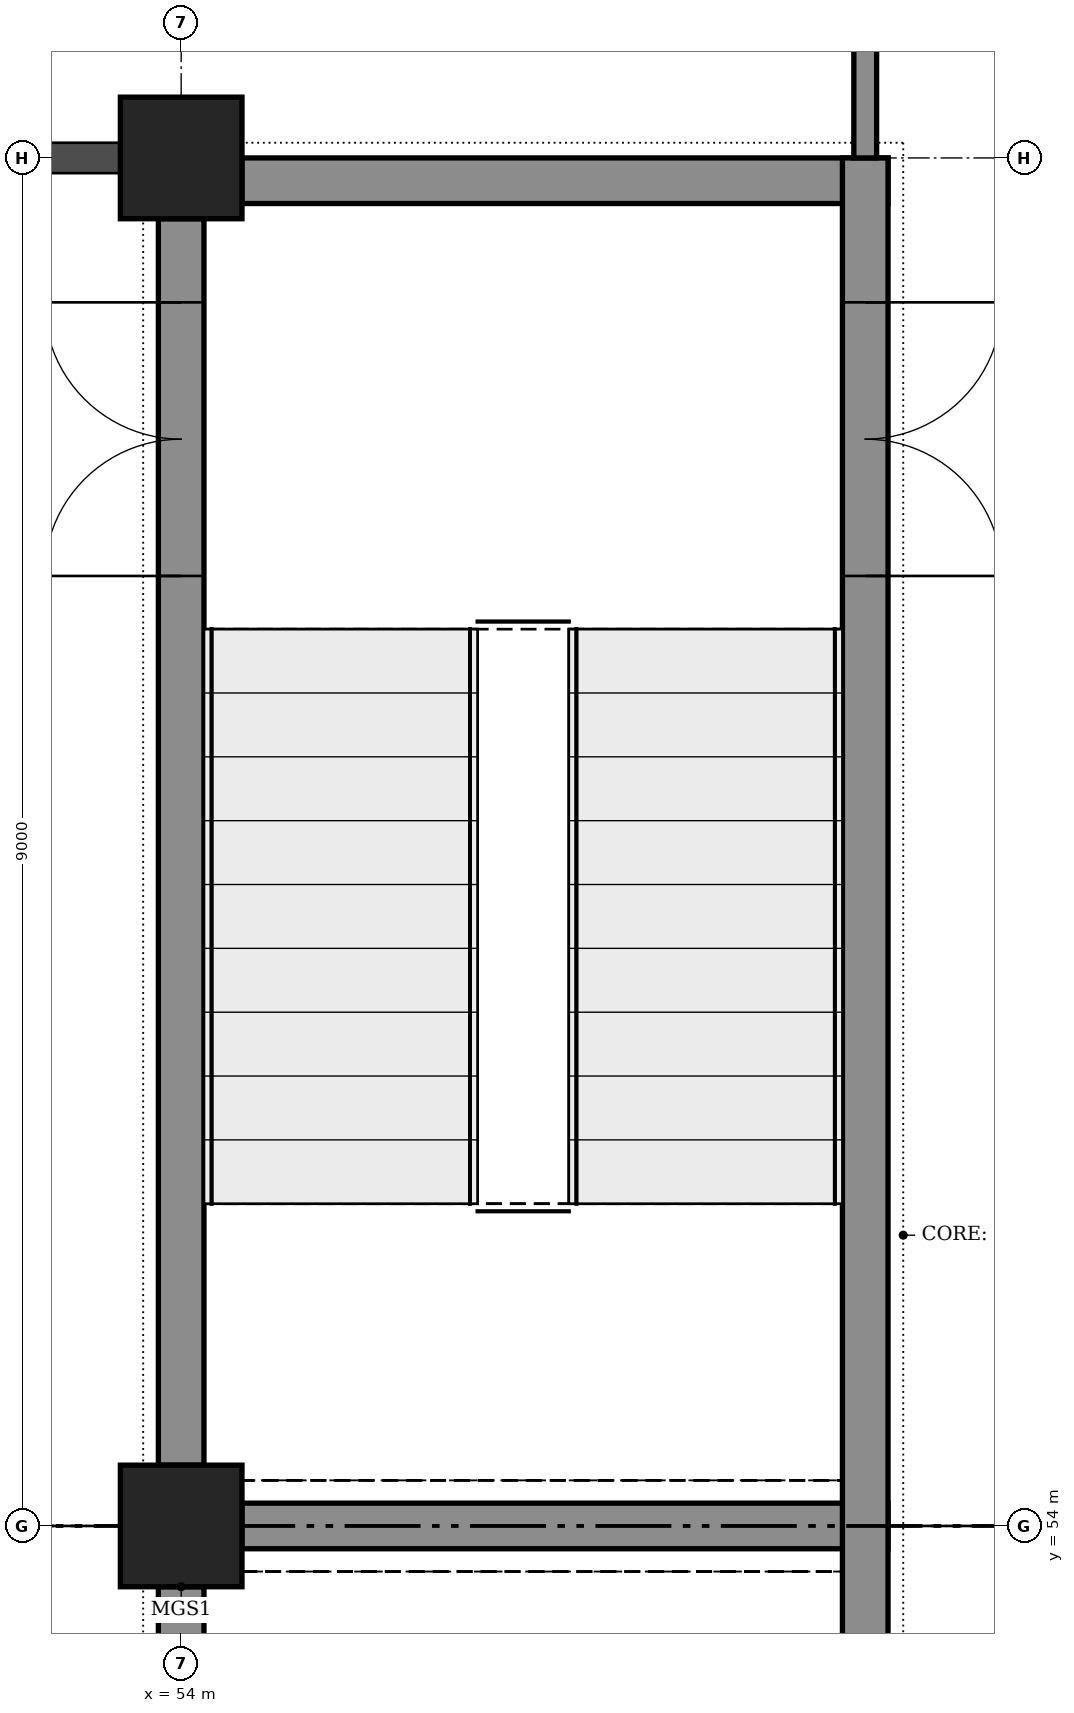
"""IFC4 building model, lengths in metres.
Left out: names, types, materials, properties, quantities, classifications, styles, units other than length and angle.
Written with IfcOpenShell. Run it as: python <this file> out.ifc"""

import sys

from ifc_helpers import new_model, si_unit, direction, frame, frame_2d, origin, origin_2d, place, context, subcontext, project, spatial, rectangle, extrude, element, fill, save


model = new_model("IFC4")
c1 = context("Model", 3, precision=1e-05, world=origin(), true_north=direction((0.0, 1.0)))
c2 = subcontext(c1, "Body", "Model", "MODEL_VIEW")
j1 = project(units=[si_unit("LENGTHUNIT", "METRE"), si_unit("PLANEANGLEUNIT", "RADIAN")], contexts=[c1])
p1 = place(None, origin())
s1 = spatial("IfcSite", under=j1, at=p1, CompositionType="ELEMENT")
p2 = place(p1, origin())
s2 = spatial("IfcBuilding", under=s1, at=p2, CompositionType="ELEMENT")
p3 = place(p2, origin())
s3 = spatial("IfcBuildingStorey", under=s2, at=p3, CompositionType="ELEMENT", Elevation=0.0)
for number, where, z_axis, x_axis in (
    (1, (54.0, 54.0, -0.3), (0.0, 0.0, 1.0), (1.0, 0.0, 0.0)),
    (2, (54.0, 63.0, -0.3), (0.0, 0.0, 1.0), (1.0, 0.0, 0.0)),
):
    element("IfcColumn", number, at=place(p3, frame(where, z_axis=z_axis, x_axis=x_axis)), inside=s3, PredefinedType="COLUMN", context=c2, shape_type="SweptSolid", body=[
        extrude(rectangle(XDim=0.8, YDim=0.8, at=origin_2d()), origin(), (0.0, 0.0, 1.0), 6.3),
    ])
p4 = place(p3, frame((58.5, 45.0, 0.0), z_axis=(0.0, 0.0, 1.0), x_axis=(0.0, 1.0, 0.0)))
e3 = element("IfcWall", 3, at=p4, inside=s3, PredefinedType="SOLIDWALL", context=c2, shape_type="SweptSolid", body=[
    extrude(rectangle(XDim=18.0, YDim=0.3, at=frame_2d((9.0, 0.0))), origin(), (0.0, 0.0, 1.0), 5.72),
])
p5 = place(p4, frame((0.85, 0.0, 0.0)))
e4 = element("IfcOpeningElement", 4, at=p5, cuts=e3, PredefinedType="OPENING", context=c2, shape_type="SweptSolid", body=[
    extrude(rectangle(XDim=1.8, YDim=2.4, at=frame_2d((0.9, 1.2))), frame((0.0, 0.16, 0.0), z_axis=(0.0, -1.0, 0.0), x_axis=(1.0, 0.0, 0.0)), (0.0, 0.0, 1.0), 0.32),
])
p6 = place(p4, frame((15.25, 0.0, 0.0)))
e5 = element("IfcOpeningElement", 5, at=p6, cuts=e3, PredefinedType="OPENING", context=c2, shape_type="SweptSolid", body=[
    extrude(rectangle(XDim=1.8, YDim=2.4, at=frame_2d((0.9, 1.2))), frame((0.0, 0.16, 0.0), z_axis=(0.0, -1.0, 0.0), x_axis=(1.0, 0.0, 0.0)), (0.0, 0.0, 1.0), 0.32),
])
p7 = place(p3, frame((54.0, 45.4, 0.0), z_axis=(0.0, 0.0, 1.0), x_axis=(0.0, 1.0, 0.0)))
e6 = element("IfcWall", 6, at=p7, inside=s3, PredefinedType="SOLIDWALL", context=c2, shape_type="SweptSolid", body=[
    extrude(rectangle(XDim=8.2, YDim=0.3, at=frame_2d((4.1, 0.0))), origin(), (0.0, 0.0, 1.0), 5.72),
])
p8 = place(p7, frame((0.45, 0.0, 0.0)))
e7 = element("IfcOpeningElement", 7, at=p8, cuts=e6, PredefinedType="OPENING", context=c2, shape_type="SweptSolid", body=[
    extrude(rectangle(XDim=1.8, YDim=2.4, at=frame_2d((0.9, 1.2))), frame((0.0, 0.16, 0.0), z_axis=(0.0, -1.0, 0.0), x_axis=(1.0, 0.0, 0.0)), (0.0, 0.0, 1.0), 0.32),
])
p9 = place(p3, frame((54.0, 54.4, 0.0), z_axis=(0.0, 0.0, 1.0), x_axis=(0.0, 1.0, 0.0)))
e8 = element("IfcWall", 8, at=p9, inside=s3, PredefinedType="SOLIDWALL", context=c2, shape_type="SweptSolid", body=[
    extrude(rectangle(XDim=8.2, YDim=0.3, at=frame_2d((4.1, 0.0))), origin(), (0.0, 0.0, 1.0), 5.72),
])
p10 = place(p9, frame((5.85, 0.0, 0.0)))
e9 = element("IfcOpeningElement", 9, at=p10, cuts=e8, PredefinedType="OPENING", context=c2, shape_type="SweptSolid", body=[
    extrude(rectangle(XDim=1.8, YDim=2.4, at=frame_2d((0.9, 1.2))), frame((0.0, 0.16, 0.0), z_axis=(0.0, -1.0, 0.0), x_axis=(1.0, 0.0, 0.0)), (0.0, 0.0, 1.0), 0.32),
])
for number, where, z_axis, x_axis in (
    (10, (54.4, 54.0, 0.0), (0.0, 0.0, 1.0), (1.0, 0.0, 0.0)),
    (11, (54.4, 62.85, 0.0), (0.0, 0.0, 1.0), (1.0, 0.0, 0.0)),
):
    element("IfcWall", number, at=place(p3, frame(where, z_axis=z_axis, x_axis=x_axis)), inside=s3, PredefinedType="SOLIDWALL", context=c2, shape_type="SweptSolid", body=[
        extrude(rectangle(XDim=4.25, YDim=0.3, at=frame_2d((2.125, 0.0))), origin(), (0.0, 0.0, 1.0), 5.72),
    ])
p11 = place(p3, frame((58.5, 63.0, 0.0), z_axis=(0.0, 0.0, 1.0), x_axis=(0.0, 1.0, 0.0)))
e12 = element("IfcWall", 12, at=p11, inside=s3, PredefinedType="PARTITIONING", context=c2, shape_type="SweptSolid", body=[
    extrude(rectangle(XDim=36.0, YDim=0.15, at=frame_2d((18.0, 0.0))), origin(), (0.0, 0.0, 1.0), 5.72),
])
p12 = place(p11, frame((8.1, 0.0, 0.0)))
e13 = element("IfcOpeningElement", 13, at=p12, cuts=e12, PredefinedType="OPENING", context=c2, shape_type="SweptSolid", body=[
    extrude(rectangle(XDim=1.8, YDim=2.4, at=frame_2d((0.9, 1.2))), frame((0.0, 0.085, 0.0), z_axis=(0.0, -1.0, 0.0), x_axis=(1.0, 0.0, 0.0)), (0.0, 0.0, 1.0), 0.17),
])
p13 = place(p11, frame((26.1, 0.0, 0.0)))
e14 = element("IfcOpeningElement", 14, at=p13, cuts=e12, PredefinedType="OPENING", context=c2, shape_type="SweptSolid", body=[
    extrude(rectangle(XDim=1.8, YDim=2.4, at=frame_2d((0.9, 1.2))), frame((0.0, 0.085, 0.0), z_axis=(0.0, -1.0, 0.0), x_axis=(1.0, 0.0, 0.0)), (0.0, 0.0, 1.0), 0.17),
])
p14 = place(p6, frame((1.8, 0.0, 0.0), z_axis=(0.0, 0.0, 1.0), x_axis=(-1.0, 0.0, 0.0)))
e15 = element("IfcDoor", 15, at=p14, inside=s3, OperationType="DOUBLE_DOOR_SINGLE_SWING", PredefinedType="DOOR", context=c2, shape_type="SweptSolid", body=[
    extrude(rectangle(XDim=1.8, YDim=2.4, at=frame_2d((0.9, 1.2))), frame((0.0, 0.025, 0.0), z_axis=(0.0, -1.0, 0.0), x_axis=(1.0, 0.0, 0.0)), (0.0, 0.0, 1.0), 0.05),
])
fill(e5, e15)
p15 = place(p10, origin())
e16 = element("IfcDoor", 16, at=p15, inside=s3, OperationType="DOUBLE_DOOR_SINGLE_SWING", PredefinedType="DOOR", context=c2, shape_type="SweptSolid", body=[
    extrude(rectangle(XDim=1.8, YDim=2.4, at=frame_2d((0.9, 1.2))), frame((0.0, 0.025, 0.0), z_axis=(0.0, -1.0, 0.0), x_axis=(1.0, 0.0, 0.0)), (0.0, 0.0, 1.0), 0.05),
])
fill(e9, e16)
save(model, sys.argv[1])
